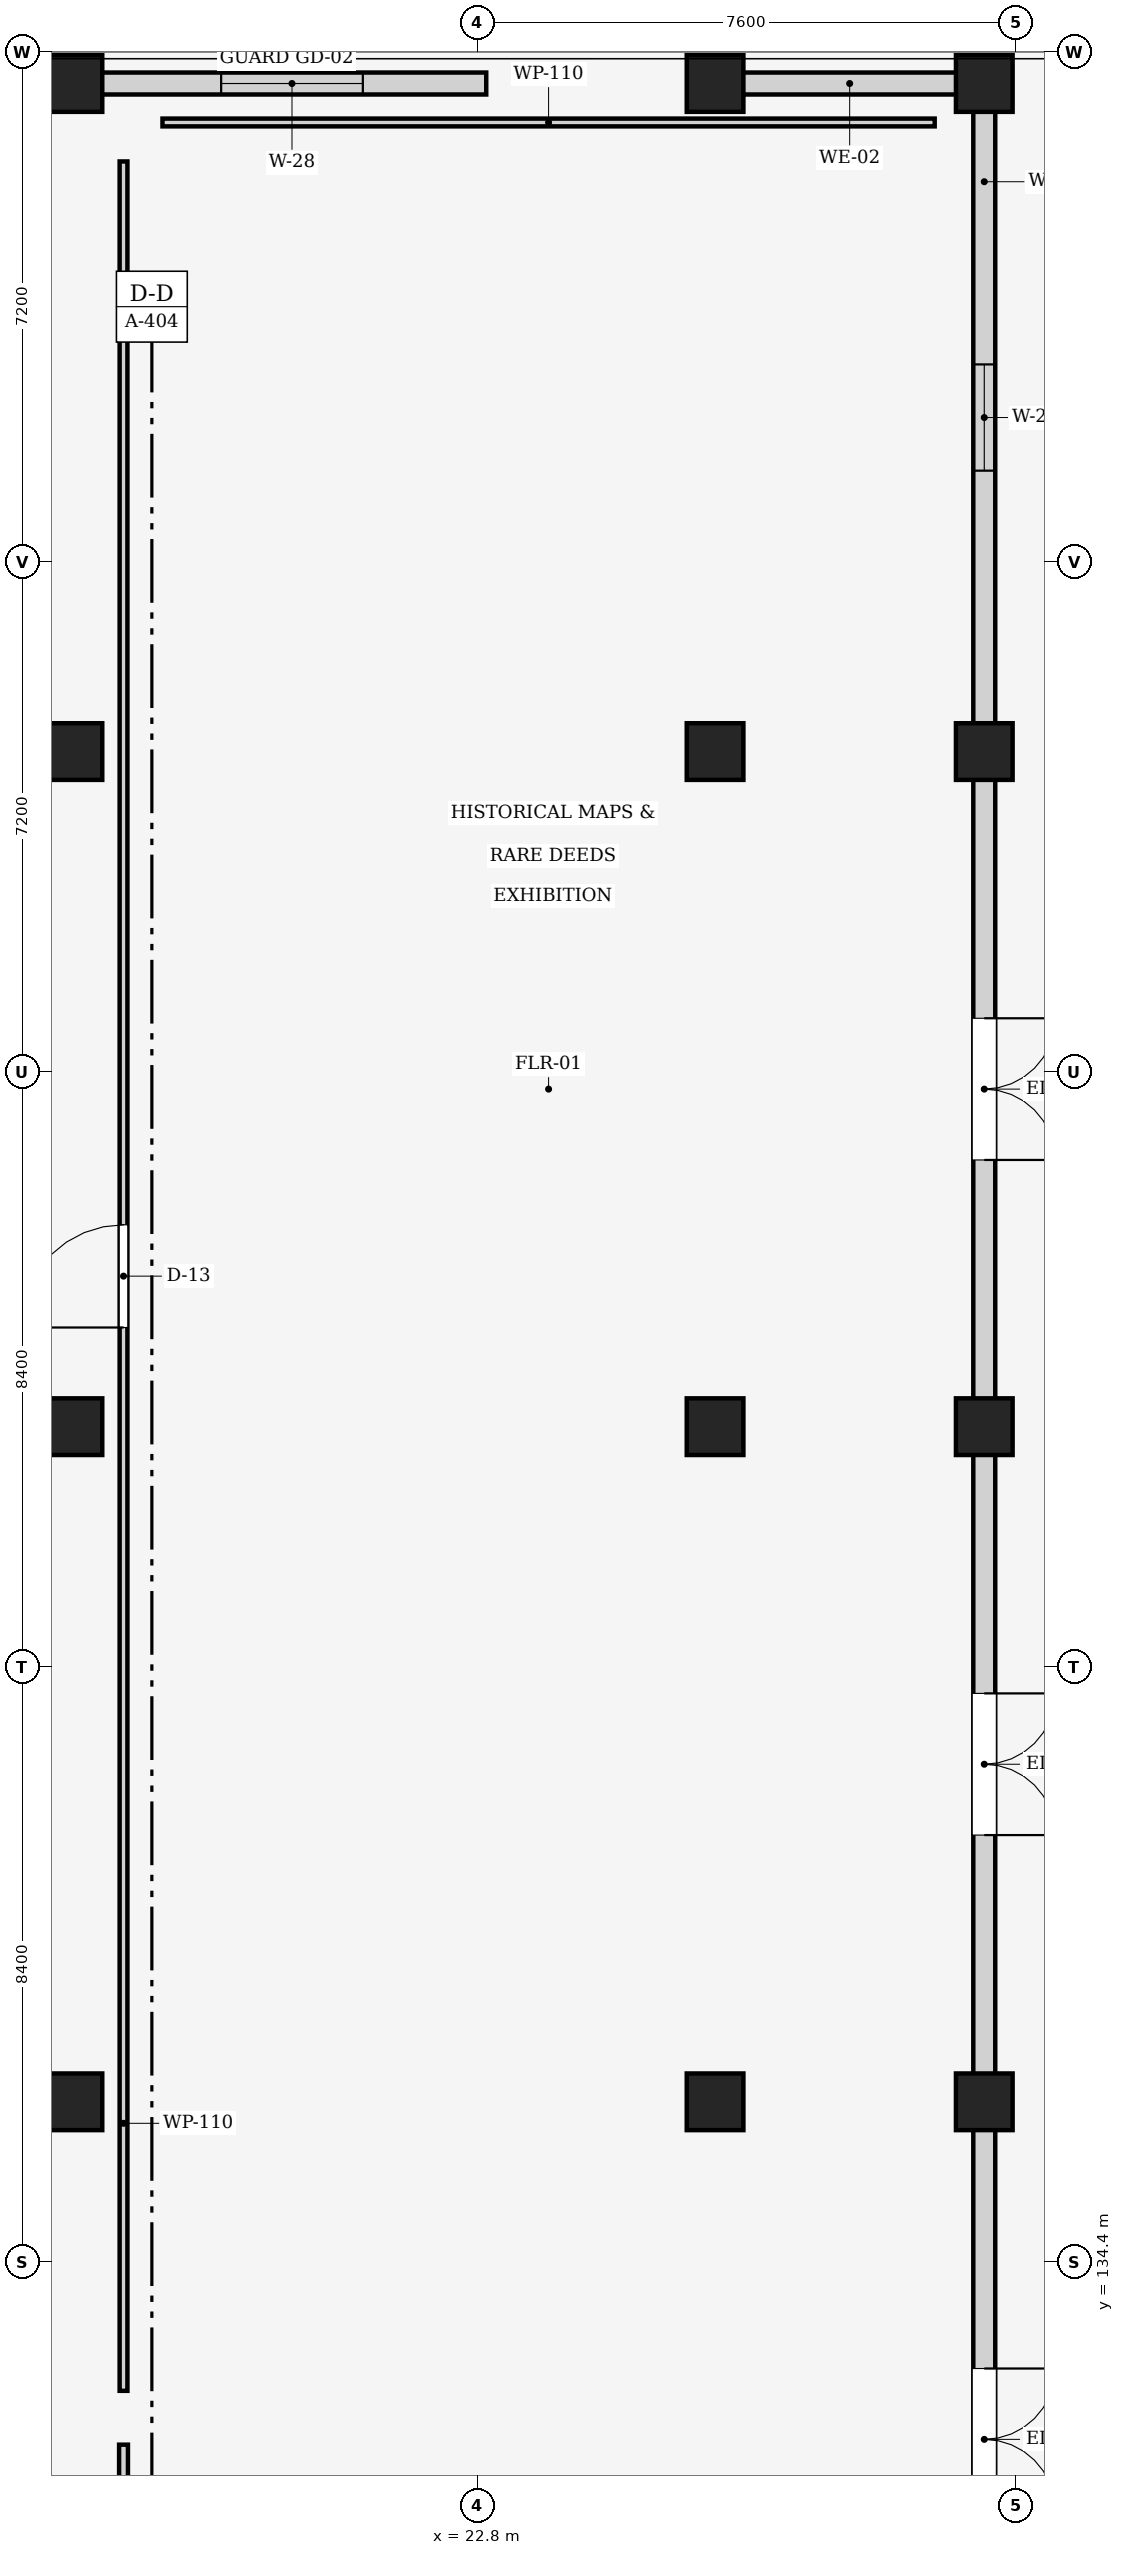
"""IFC4 building model, lengths in metres.
Left out: names, types, materials, properties, quantities, classifications, styles, units other than length and angle.
Written with IfcOpenShell. Run it as: python <this file> out.ifc"""

import sys

from ifc_helpers import new_model, si_unit, direction, frame, frame_2d, origin, origin_2d, place, context, subcontext, project, spatial, rectangle, extrude, element, fill, save


model = new_model("IFC4")
c1 = context("Model", 3, precision=1e-05, world=origin(), true_north=direction((0.0, 1.0)))
c2 = subcontext(c1, "Body", "Model", "MODEL_VIEW")
j1 = project(units=[si_unit("LENGTHUNIT", "METRE"), si_unit("PLANEANGLEUNIT", "RADIAN")], contexts=[c1])
p1 = place(None, origin())
s1 = spatial("IfcSite", under=j1, at=p1, CompositionType="ELEMENT")
p2 = place(p1, origin())
s2 = spatial("IfcBuilding", under=s1, at=p2, CompositionType="ELEMENT")
p3 = place(p2, origin())
s3 = spatial("IfcBuildingStorey", under=s2, at=p3, CompositionType="ELEMENT", Elevation=0.0)
for number, where, z_axis, x_axis in (
    (1, (17.1, 136.66, 0.0), (0.0, 0.0, 1.0), (1.0, 0.0, 0.0)),
    (2, (17.1, 146.19, 0.0), (0.0, 0.0, 1.0), (1.0, 0.0, 0.0)),
    (3, (17.1, 155.72, 0.0), (0.0, 0.0, 1.0), (1.0, 0.0, 0.0)),
    (4, (17.1, 165.15, 0.0), (0.0, 0.0, 1.0), (1.0, 0.0, 0.0)),
    (5, (26.15, 136.66, 0.0), (0.0, 0.0, 1.0), (1.0, 0.0, 0.0)),
    (6, (26.15, 146.19, 0.0), (0.0, 0.0, 1.0), (1.0, 0.0, 0.0)),
    (7, (26.15, 155.72, 0.0), (0.0, 0.0, 1.0), (1.0, 0.0, 0.0)),
    (8, (26.15, 165.15, 0.0), (0.0, 0.0, 1.0), (1.0, 0.0, 0.0)),
    (9, (29.95, 136.66, 0.0), (0.0, 0.0, 1.0), (1.0, 0.0, 0.0)),
    (10, (29.95, 146.19, 0.0), (0.0, 0.0, 1.0), (1.0, 0.0, 0.0)),
    (11, (29.95, 155.72, 0.0), (0.0, 0.0, 1.0), (1.0, 0.0, 0.0)),
    (12, (29.95, 165.15, 0.0), (0.0, 0.0, 1.0), (1.0, 0.0, 0.0)),
):
    element("IfcColumn", number, at=place(p3, frame(where, z_axis=z_axis, x_axis=x_axis)), inside=s3, PredefinedType="COLUMN", context=c2, shape_type="SweptSolid", body=[
        extrude(rectangle(XDim=0.8, YDim=0.8, at=origin_2d()), origin(), (0.0, 0.0, 1.0), 5.1),
    ])
p4 = place(p3, frame((29.95, 164.815, 0.0), z_axis=(0.0, 0.0, 1.0), x_axis=(0.0, -1.0, 0.0)))
e13 = element("IfcWall", 13, at=p4, inside=s3, PredefinedType="STANDARD", context=c2, shape_type="SweptSolid", body=[
    extrude(rectangle(XDim=8.76, YDim=0.31, at=frame_2d((4.38, 0.0))), origin(), (0.0, 0.0, 1.0), 4.195),
])
p5 = place(p4, frame((3.63, 0.0, 0.85)))
e14 = element("IfcOpeningElement", 14, at=p5, cuts=e13, PredefinedType="OPENING", context=c2, shape_type="SweptSolid", body=[
    extrude(rectangle(XDim=1.5, YDim=1.85, at=frame_2d((0.75, 0.925))), frame((0.0, 0.165, 0.0), z_axis=(0.0, -1.0, 0.0), x_axis=(1.0, 0.0, 0.0)), (0.0, 0.0, 1.0), 0.33),
])
p6 = place(p3, frame((29.95, 155.385, 0.0), z_axis=(0.0, 0.0, 1.0), x_axis=(0.0, -1.0, 0.0)))
e15 = element("IfcWall", 15, at=p6, inside=s3, PredefinedType="STANDARD", context=c2, shape_type="SweptSolid", body=[
    extrude(rectangle(XDim=8.86, YDim=0.31, at=frame_2d((4.43, 0.0))), origin(), (0.0, 0.0, 1.0), 4.195),
])
p7 = place(p6, frame((3.43, 0.0, 0.0)))
e16 = element("IfcOpeningElement", 16, at=p7, cuts=e15, PredefinedType="OPENING", context=c2, shape_type="SweptSolid", body=[
    extrude(rectangle(XDim=2.0, YDim=2.4, at=frame_2d((1.0, 1.2))), frame((0.0, 0.165, 0.0), z_axis=(0.0, -1.0, 0.0), x_axis=(1.0, 0.0, 0.0)), (0.0, 0.0, 1.0), 0.33),
])
p8 = place(p3, frame((29.95, 145.855, 0.0), z_axis=(0.0, 0.0, 1.0), x_axis=(0.0, -1.0, 0.0)))
e17 = element("IfcWall", 17, at=p8, inside=s3, PredefinedType="STANDARD", context=c2, shape_type="SweptSolid", body=[
    extrude(rectangle(XDim=8.86, YDim=0.31, at=frame_2d((4.43, 0.0))), origin(), (0.0, 0.0, 1.0), 4.195),
])
p9 = place(p8, frame((3.43, 0.0, 0.0)))
e18 = element("IfcOpeningElement", 18, at=p9, cuts=e17, PredefinedType="OPENING", context=c2, shape_type="SweptSolid", body=[
    extrude(rectangle(XDim=2.0, YDim=2.4, at=frame_2d((1.0, 1.2))), frame((0.0, 0.165, 0.0), z_axis=(0.0, -1.0, 0.0), x_axis=(1.0, 0.0, 0.0)), (0.0, 0.0, 1.0), 0.33),
])
p10 = place(p3, frame((29.95, 136.325, 0.0), z_axis=(0.0, 0.0, 1.0), x_axis=(0.0, -1.0, 0.0)))
e19 = element("IfcWall", 19, at=p10, inside=s3, PredefinedType="STANDARD", context=c2, shape_type="SweptSolid", body=[
    extrude(rectangle(XDim=8.86, YDim=0.31, at=frame_2d((4.43, 0.0))), origin(), (0.0, 0.0, 1.0), 4.195),
])
p11 = place(p10, frame((3.43, 0.0, 0.0)))
e20 = element("IfcOpeningElement", 20, at=p11, cuts=e19, PredefinedType="OPENING", context=c2, shape_type="SweptSolid", body=[
    extrude(rectangle(XDim=2.0, YDim=2.4, at=frame_2d((1.0, 1.2))), frame((0.0, 0.165, 0.0), z_axis=(0.0, -1.0, 0.0), x_axis=(1.0, 0.0, 0.0)), (0.0, 0.0, 1.0), 0.33),
])
p12 = place(p3, frame((17.435, 165.15, 0.0), z_axis=(0.0, 0.0, 1.0), x_axis=(1.0, 0.0, 0.0)))
e21 = element("IfcWall", 21, at=p12, inside=s3, PredefinedType="STANDARD", context=c2, shape_type="SweptSolid", body=[
    extrude(rectangle(XDim=5.485, YDim=0.31, at=frame_2d((2.742, 0.0))), origin(), (0.0, 0.0, 1.0), 4.045),
])
p13 = place(p12, frame((1.743, 0.0, 0.85)))
e22 = element("IfcOpeningElement", 22, at=p13, cuts=e21, PredefinedType="OPENING", context=c2, shape_type="SweptSolid", body=[
    extrude(rectangle(XDim=2.0, YDim=1.85, at=frame_2d((1.0, 0.925))), frame((0.0, 0.165, 0.0), z_axis=(0.0, -1.0, 0.0), x_axis=(1.0, 0.0, 0.0)), (0.0, 0.0, 1.0), 0.33),
])
p14 = place(p3, frame((26.485, 165.15, 0.0), z_axis=(0.0, 0.0, 1.0), x_axis=(1.0, 0.0, 0.0)))
e23 = element("IfcWall", 23, at=p14, inside=s3, PredefinedType="STANDARD", context=c2, shape_type="SweptSolid", body=[
    extrude(rectangle(XDim=3.13, YDim=0.31, at=frame_2d((1.565, 0.0))), origin(), (0.0, 0.0, 1.0), 4.045),
])
p15 = place(p3, frame((17.8, 102.15, 0.0), z_axis=(0.0, 0.0, 1.0), x_axis=(0.0, 1.0, 0.0)))
e24 = element("IfcWall", 24, at=p15, inside=s3, PredefinedType="PARTITIONING", context=c2, shape_type="SweptSolid", body=[
    extrude(rectangle(XDim=29.67, YDim=0.125, at=frame_2d((14.835, 0.0))), origin(), (0.0, 0.0, 1.0), 4.045),
])
p16 = place(p15, frame((13.335, 0.0, 0.0)))
e25 = element("IfcOpeningElement", 25, at=p16, cuts=e24, PredefinedType="OPENING", context=c2, shape_type="SweptSolid", body=[
    extrude(rectangle(XDim=1.3, YDim=2.22, at=frame_2d((0.65, 1.11))), frame((0.0, 0.073, 0.0), z_axis=(0.0, -1.0, 0.0), x_axis=(1.0, 0.0, 0.0)), (0.0, 0.0, 1.0), 0.145),
])
p17 = place(p3, frame((17.8, 132.58, 0.0), z_axis=(0.0, 0.0, 1.0), x_axis=(0.0, 1.0, 0.0)))
e26 = element("IfcWall", 26, at=p17, inside=s3, PredefinedType="PARTITIONING", context=c2, shape_type="SweptSolid", body=[
    extrude(rectangle(XDim=31.47, YDim=0.11, at=frame_2d((15.735, 0.0))), origin(), (0.0, 0.0, 1.0), 4.045),
])
p18 = place(p17, frame((15.01, 0.0, 0.0)))
e27 = element("IfcOpeningElement", 27, at=p18, cuts=e26, PredefinedType="OPENING", context=c2, shape_type="SweptSolid", body=[
    extrude(rectangle(XDim=1.45, YDim=2.22, at=frame_2d((0.725, 1.11))), frame((0.0, 0.065, 0.0), z_axis=(0.0, -1.0, 0.0), x_axis=(1.0, 0.0, 0.0)), (0.0, 0.0, 1.0), 0.13),
])
p19 = place(p3, frame((18.35, 164.6, 0.0), z_axis=(0.0, 0.0, 1.0), x_axis=(1.0, 0.0, 0.0)))
e28 = element("IfcWall", 28, at=p19, inside=s3, PredefinedType="PARTITIONING", context=c2, shape_type="SweptSolid", body=[
    extrude(rectangle(XDim=10.9, YDim=0.11, at=frame_2d((5.45, 0.0))), origin(), (0.0, 0.0, 1.0), 4.195),
])
p20 = place(p5, origin())
e29 = element("IfcWindow", 29, at=p20, inside=s3, PartitioningType="SINGLE_PANEL", PredefinedType="WINDOW", context=c2, shape_type="SweptSolid", body=[
    extrude(rectangle(XDim=1.5, YDim=1.85, at=frame_2d((0.75, 0.925))), frame((0.0, 0.03, 0.0), z_axis=(0.0, -1.0, 0.0), x_axis=(1.0, 0.0, 0.0)), (0.0, 0.0, 1.0), 0.06),
])
fill(e14, e29)
p21 = place(p7, origin())
e30 = element("IfcDoor", 30, at=p21, inside=s3, OperationType="DOUBLE_DOOR_SINGLE_SWING", PredefinedType="DOOR", context=c2, shape_type="SweptSolid", body=[
    extrude(rectangle(XDim=2.0, YDim=2.4, at=frame_2d((1.0, 1.2))), frame((0.0, 0.025, 0.0), z_axis=(0.0, -1.0, 0.0), x_axis=(1.0, 0.0, 0.0)), (0.0, 0.0, 1.0), 0.05),
])
fill(e16, e30)
p22 = place(p9, origin())
e31 = element("IfcDoor", 31, at=p22, inside=s3, OperationType="DOUBLE_DOOR_SINGLE_SWING", PredefinedType="DOOR", context=c2, shape_type="SweptSolid", body=[
    extrude(rectangle(XDim=2.0, YDim=2.4, at=frame_2d((1.0, 1.2))), frame((0.0, 0.025, 0.0), z_axis=(0.0, -1.0, 0.0), x_axis=(1.0, 0.0, 0.0)), (0.0, 0.0, 1.0), 0.05),
])
fill(e18, e31)
p23 = place(p11, origin())
e32 = element("IfcDoor", 32, at=p23, inside=s3, OperationType="DOUBLE_DOOR_SINGLE_SWING", PredefinedType="DOOR", context=c2, shape_type="SweptSolid", body=[
    extrude(rectangle(XDim=2.0, YDim=2.4, at=frame_2d((1.0, 1.2))), frame((0.0, 0.025, 0.0), z_axis=(0.0, -1.0, 0.0), x_axis=(1.0, 0.0, 0.0)), (0.0, 0.0, 1.0), 0.05),
])
fill(e20, e32)
p24 = place(p13, origin())
e33 = element("IfcWindow", 33, at=p24, inside=s3, PartitioningType="SINGLE_PANEL", PredefinedType="WINDOW", context=c2, shape_type="SweptSolid", body=[
    extrude(rectangle(XDim=2.0, YDim=1.85, at=frame_2d((1.0, 0.925))), frame((0.0, 0.03, 0.0), z_axis=(0.0, -1.0, 0.0), x_axis=(1.0, 0.0, 0.0)), (0.0, 0.0, 1.0), 0.06),
])
fill(e22, e33)
p25 = place(p18, origin())
e34 = element("IfcDoor", 34, at=p25, inside=s3, OperationType="SINGLE_SWING_LEFT", PredefinedType="DOOR", context=c2, shape_type="SweptSolid", body=[
    extrude(rectangle(XDim=1.45, YDim=2.22, at=frame_2d((0.725, 1.11))), frame((0.0, 0.025, 0.0), z_axis=(0.0, -1.0, 0.0), x_axis=(1.0, 0.0, 0.0)), (0.0, 0.0, 1.0), 0.05),
])
fill(e27, e34)
save(model, sys.argv[1])
